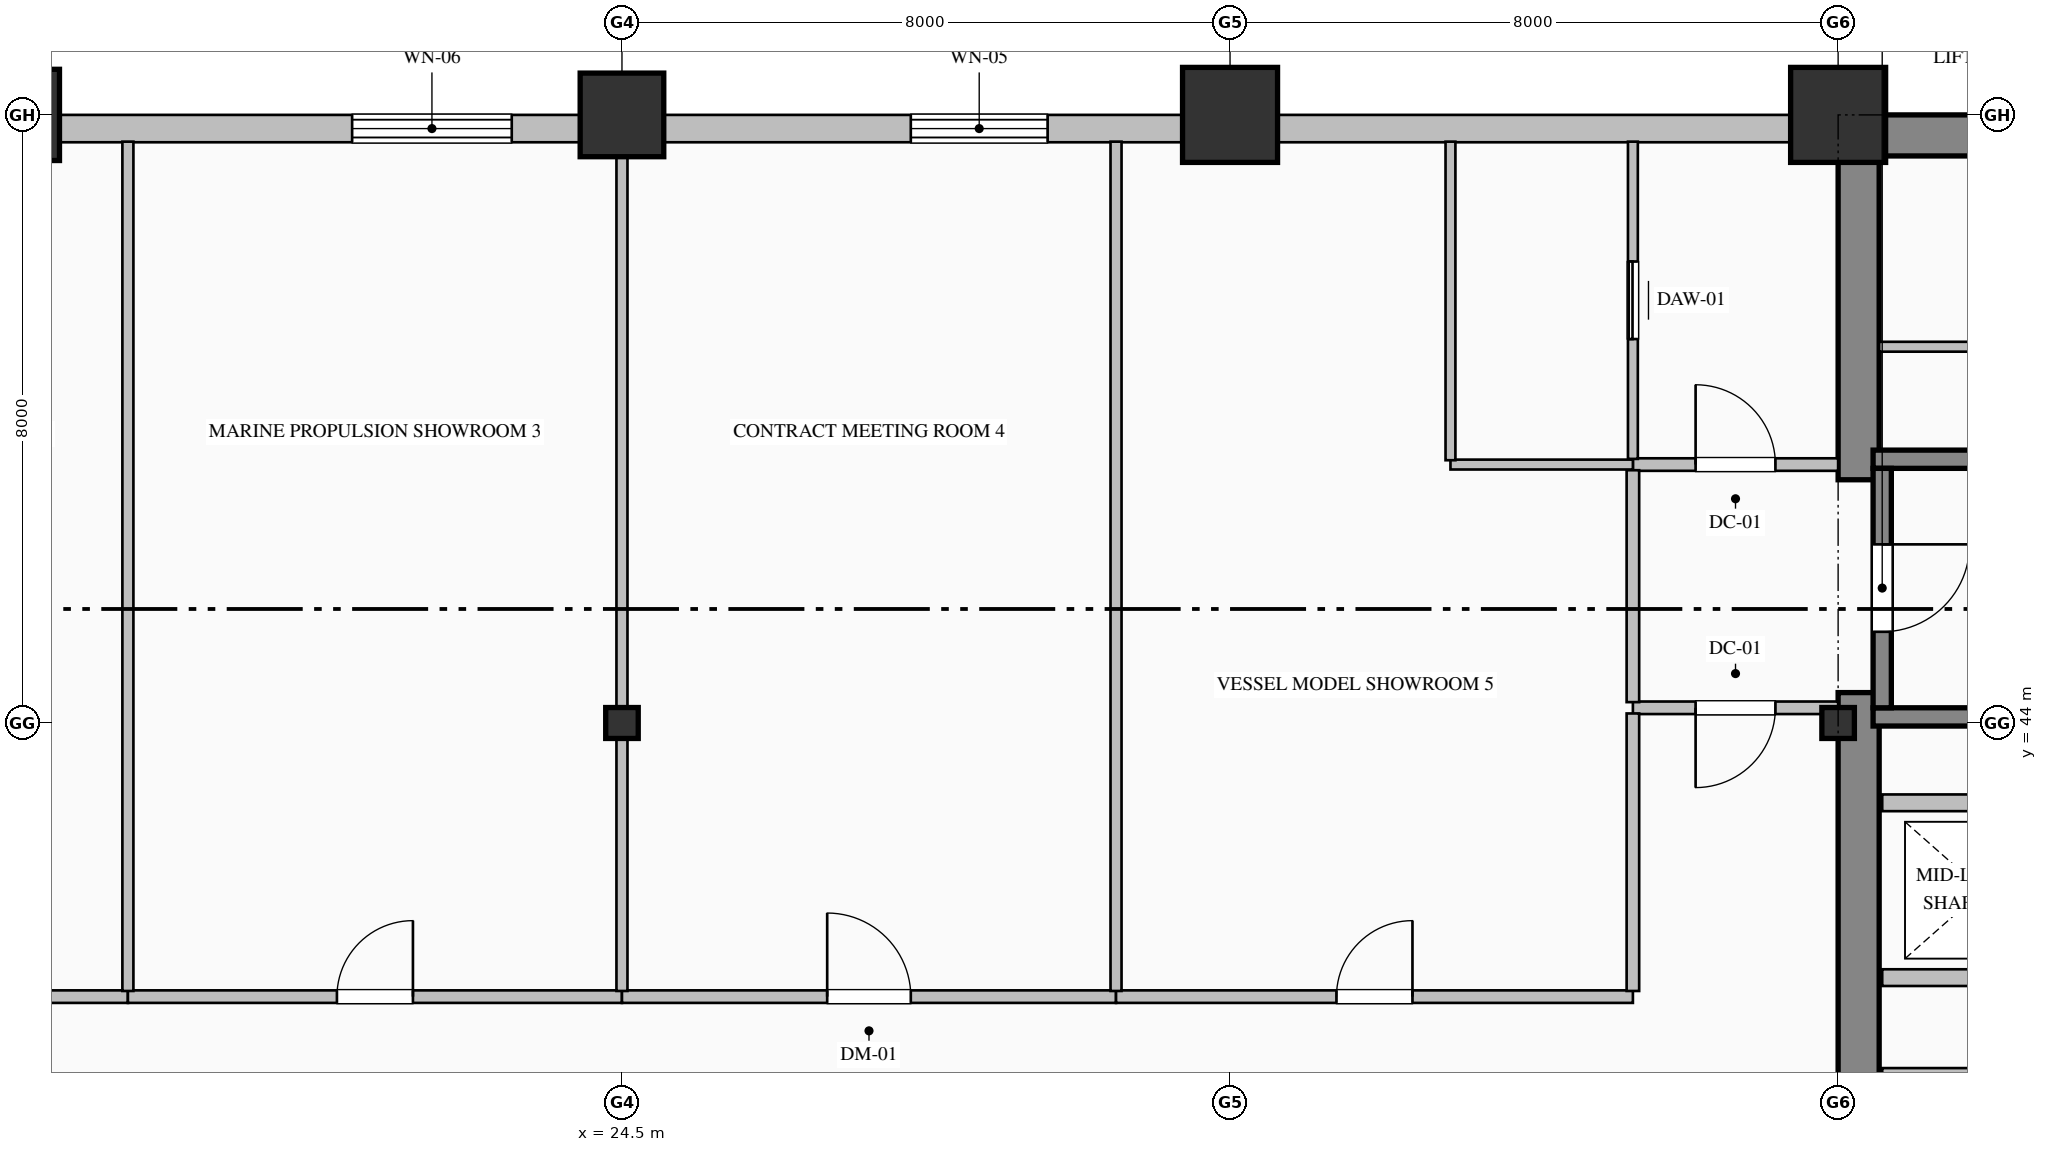
"""IFC4 building model, lengths in metres.
Left out: names, types, materials, properties, quantities, classifications, styles, units other than length and angle.
Written with IfcOpenShell. Run it as: python <this file> out.ifc"""

import sys

from ifc_helpers import new_model, si_unit, direction, frame, frame_2d, origin, origin_2d, place, context, subcontext, project, spatial, rectangle, hollow_rectangle, hollow_circle, i_section, extrude, element, fill, save


model = new_model("IFC4")
c1 = context("Model", 3, precision=1e-05, world=origin(), true_north=direction((0.0, 1.0)))
c2 = subcontext(c1, "Body", "Model", "MODEL_VIEW")
j1 = project(units=[si_unit("LENGTHUNIT", "METRE"), si_unit("PLANEANGLEUNIT", "RADIAN")], contexts=[c1])
p1 = place(None, origin())
s1 = spatial("IfcSite", under=j1, at=p1, CompositionType="ELEMENT")
p2 = place(p1, origin())
s2 = spatial("IfcBuilding", under=s1, at=p2, CompositionType="ELEMENT")
p3 = place(p2, frame((0.0, 0.0, 92.2)))
s3 = spatial("IfcBuildingStorey", under=s2, at=p3, CompositionType="ELEMENT", Elevation=92.2)
p4 = place(p3, frame((40.5, 51.73, 0.0), z_axis=(0.0, 0.0, 1.0), x_axis=(1.0, 0.0, 0.0)))
e1 = element("IfcWall", 1, at=p4, inside=s3, PredefinedType="SHEAR", context=c2, shape_type="SweptSolid", body=[
    extrude(rectangle(XDim=23.5, YDim=0.54, at=frame_2d((11.75, 0.0))), origin(), (0.0, 0.0, 1.0), 3.75),
])
p5 = place(p3, frame((40.77, 36.54, 0.0), z_axis=(0.0, 0.0, 1.0), x_axis=(0.0, 1.0, 0.0)))
e2 = element("IfcWall", 2, at=p5, inside=s3, PredefinedType="SHEAR", context=c2, shape_type="SweptSolid", body=[
    extrude(rectangle(XDim=7.86, YDim=0.54, at=frame_2d((3.93, 0.0))), origin(), (0.0, 0.0, 1.0), 3.75),
])
p6 = place(p3, frame((40.77, 47.2, 0.0), z_axis=(0.0, 0.0, 1.0), x_axis=(0.0, 1.0, 0.0)))
e3 = element("IfcWall", 3, at=p6, inside=s3, PredefinedType="SHEAR", context=c2, shape_type="SweptSolid", body=[
    extrude(rectangle(XDim=4.26, YDim=0.54, at=frame_2d((2.13, 0.0))), origin(), (0.0, 0.0, 1.0), 3.75),
])
p7 = place(p3, frame((16.5, 52.0, 0.0), z_axis=(0.0, 0.0, 1.0), x_axis=(1.0, 0.0, 0.0)))
e4 = element("IfcColumn", 4, at=p7, inside=s3, PredefinedType="COLUMN", context=c2, shape_type="SweptSolid", body=[
    extrude(hollow_circle(Radius=0.6, WallThickness=0.04, at=origin_2d()), origin(), (0.0, 0.0, 1.0), 4.0),
])
p8 = place(p3, frame((24.5, 44.0, 0.0), z_axis=(0.0, 0.0, 1.0), x_axis=(1.0, 0.0, 0.0)))
e5 = element("IfcColumn", 5, at=p8, inside=s3, PredefinedType="COLUMN", context=c2, shape_type="SweptSolid", body=[
    extrude(i_section(OverallWidth=0.407, OverallDepth=0.428, WebThickness=0.02, FlangeThickness=0.035, FilletRadius=0.022, at=origin_2d()), origin(), (0.0, 0.0, 1.0), 4.0),
])
p9 = place(p3, frame((24.5, 52.0, 0.0), z_axis=(0.0, 0.0, 1.0), x_axis=(1.0, 0.0, 0.0)))
e6 = element("IfcColumn", 6, at=p9, inside=s3, PredefinedType="COLUMN", context=c2, shape_type="SweptSolid", body=[
    extrude(hollow_rectangle(XDim=1.1, YDim=1.1, WallThickness=0.04, at=origin_2d()), origin(), (0.0, 0.0, 1.0), 4.0),
])
p10 = place(p3, frame((32.5, 52.0, 0.0), z_axis=(0.0, 0.0, 1.0), x_axis=(1.0, 0.0, 0.0)))
e7 = element("IfcColumn", 7, at=p10, inside=s3, PredefinedType="COLUMN", context=c2, shape_type="SweptSolid", body=[
    extrude(hollow_rectangle(XDim=1.25, YDim=1.25, WallThickness=0.045, at=origin_2d()), origin(), (0.0, 0.0, 1.0), 4.0),
])
p11 = place(p3, frame((40.5, 44.0, 0.0), z_axis=(0.0, 0.0, 1.0), x_axis=(1.0, 0.0, 0.0)))
e8 = element("IfcColumn", 8, at=p11, inside=s3, PredefinedType="COLUMN", context=c2, shape_type="SweptSolid", body=[
    extrude(i_section(OverallWidth=0.407, OverallDepth=0.428, WebThickness=0.02, FlangeThickness=0.035, FilletRadius=0.022, at=origin_2d()), origin(), (0.0, 0.0, 1.0), 4.0),
])
p12 = place(p3, frame((40.5, 52.0, 0.0), z_axis=(0.0, 0.0, 1.0), x_axis=(1.0, 0.0, 0.0)))
e9 = element("IfcColumn", 9, at=p12, inside=s3, PredefinedType="COLUMN", context=c2, shape_type="SweptSolid", body=[
    extrude(hollow_rectangle(XDim=1.25, YDim=1.25, WallThickness=0.045, at=origin_2d()), origin(), (0.0, 0.0, 1.0), 4.0),
])
p13 = place(p3, frame((4.0, 51.82, 0.0), z_axis=(0.0, 0.0, 1.0), x_axis=(1.0, 0.0, 0.0)))
e10 = element("IfcWall", 10, at=p13, inside=s3, PredefinedType="SOLIDWALL", context=c2, shape_type="SweptSolid", body=[
    extrude(rectangle(XDim=36.52, YDim=0.36, at=frame_2d((18.26, 0.0))), origin(), (0.0, 0.0, 1.0), 3.25),
])
p14 = place(p13, frame((16.95, 0.0, 0.85)))
e11 = element("IfcOpeningElement", 11, at=p14, cuts=e10, PredefinedType="OPENING", context=c2, shape_type="SweptSolid", body=[
    extrude(rectangle(XDim=2.1, YDim=2.05, at=frame_2d((1.05, 1.025))), frame((0.0, 0.19, 0.0), z_axis=(0.0, -1.0, 0.0), x_axis=(1.0, 0.0, 0.0)), (0.0, 0.0, 1.0), 0.38),
])
p15 = place(p13, frame((24.3, 0.0, 0.85)))
e12 = element("IfcOpeningElement", 12, at=p15, cuts=e10, PredefinedType="OPENING", context=c2, shape_type="SweptSolid", body=[
    extrude(rectangle(XDim=1.8, YDim=2.05, at=frame_2d((0.9, 1.025))), frame((0.0, 0.19, 0.0), z_axis=(0.0, -1.0, 0.0), x_axis=(1.0, 0.0, 0.0)), (0.0, 0.0, 1.0), 0.38),
])
for number, where, z_axis, x_axis in (
    (13, (40.96, 47.47, 0.0), (0.0, 0.0, 1.0), (1.0, 0.0, 0.0)),
    (14, (49.04, 44.08, 0.0), (0.0, 0.0, 1.0), (-1.0, 0.0, 0.0)),
):
    element("IfcWall", number, at=place(p3, frame(where, z_axis=z_axis, x_axis=x_axis)), inside=s3, PredefinedType="SOLIDWALL", context=c2, shape_type="SweptSolid", body=[
        extrude(rectangle(XDim=8.08, YDim=0.24, at=frame_2d((4.04, 0.0))), origin(), (0.0, 0.0, 1.0), 4.0),
    ])
p16 = place(p3, frame((41.08, 47.35, 0.0), z_axis=(0.0, 0.0, 1.0), x_axis=(0.0, -1.0, 0.0)))
e15 = element("IfcWall", 15, at=p16, inside=s3, PredefinedType="SOLIDWALL", context=c2, shape_type="SweptSolid", body=[
    extrude(rectangle(XDim=3.15, YDim=0.24, at=frame_2d((1.575, 0.0))), origin(), (0.0, 0.0, 1.0), 4.0),
])
p17 = place(p16, frame((1.0, 0.0, 0.0)))
e16 = element("IfcOpeningElement", 16, at=p17, cuts=e15, PredefinedType="OPENING", context=c2, shape_type="SweptSolid", body=[
    extrude(rectangle(XDim=1.15, YDim=2.2, at=frame_2d((0.575, 1.1))), frame((0.0, 0.13, 0.0), z_axis=(0.0, -1.0, 0.0), x_axis=(1.0, 0.0, 0.0)), (0.0, 0.0, 1.0), 0.26),
])
for number, where, z_axis, x_axis in (
    (17, (41.08, 39.35, 0.0), (0.0, 0.0, 1.0), (1.0, 0.0, 0.0)),
    (18, (49.32, 40.65, 0.0), (0.0, 0.0, 1.0), (-1.0, 0.0, 0.0)),
    (19, (41.08, 42.95, 0.0), (0.0, 0.0, 1.0), (1.0, 0.0, 0.0)),
):
    element("IfcWall", number, at=place(p3, frame(where, z_axis=z_axis, x_axis=x_axis)), inside=s3, PredefinedType="PARTITIONING", context=c2, shape_type="SweptSolid", body=[
        extrude(rectangle(XDim=8.24, YDim=0.22, at=frame_2d((4.12, 0.0))), origin(), (0.0, 0.0, 1.0), 3.75),
    ])
p18 = place(p3, frame((37.8, 47.4, 0.0), z_axis=(0.0, 0.0, 1.0), x_axis=(1.0, 0.0, 0.0)))
e20 = element("IfcWall", 20, at=p18, inside=s3, PredefinedType="PARTITIONING", context=c2, shape_type="SweptSolid", body=[
    extrude(rectangle(XDim=2.7, YDim=0.165, at=frame_2d((1.35, 0.0))), origin(), (0.0, 0.0, 1.0), 3.75),
])
p19 = place(p18, frame((0.825, 0.0, 0.0)))
e21 = element("IfcOpeningElement", 21, at=p19, cuts=e20, PredefinedType="OPENING", context=c2, shape_type="SweptSolid", body=[
    extrude(rectangle(XDim=1.05, YDim=2.15, at=frame_2d((0.525, 1.075))), frame((0.0, 0.093, 0.0), z_axis=(0.0, -1.0, 0.0), x_axis=(1.0, 0.0, 0.0)), (0.0, 0.0, 1.0), 0.185),
])
p20 = place(p3, frame((40.5, 44.2, 0.0), z_axis=(0.0, 0.0, 1.0), x_axis=(-1.0, 0.0, 0.0)))
e22 = element("IfcWall", 22, at=p20, inside=s3, PredefinedType="PARTITIONING", context=c2, shape_type="SweptSolid", body=[
    extrude(rectangle(XDim=2.7, YDim=0.165, at=frame_2d((1.35, 0.0))), origin(), (0.0, 0.0, 1.0), 3.75),
])
p21 = place(p20, frame((0.825, 0.0, 0.0)))
e23 = element("IfcOpeningElement", 23, at=p21, cuts=e22, PredefinedType="OPENING", context=c2, shape_type="SweptSolid", body=[
    extrude(rectangle(XDim=1.05, YDim=2.15, at=frame_2d((0.525, 1.075))), frame((0.0, 0.093, 0.0), z_axis=(0.0, -1.0, 0.0), x_axis=(1.0, 0.0, 0.0)), (0.0, 0.0, 1.0), 0.185),
])
p22 = place(p3, frame((37.8, 44.274, 0.0), z_axis=(0.0, 0.0, 1.0), x_axis=(0.0, 1.0, 0.0)))
e24 = element("IfcWall", 24, at=p22, inside=s3, PredefinedType="PARTITIONING", context=c2, shape_type="SweptSolid", body=[
    extrude(rectangle(XDim=3.051, YDim=0.165, at=frame_2d((1.525, 0.0))), origin(), (0.0, 0.0, 1.0), 3.75),
])
p23 = place(p3, frame((37.8, 47.475, 0.0), z_axis=(0.0, 0.0, 1.0), x_axis=(0.0, 1.0, 0.0)))
e25 = element("IfcWall", 25, at=p23, inside=s3, PredefinedType="PARTITIONING", context=c2, shape_type="SweptSolid", body=[
    extrude(rectangle(XDim=4.173, YDim=0.13, at=frame_2d((2.087, 0.0))), origin(), (0.0, 0.0, 1.0), 3.75),
])
p24 = place(p23, frame((1.577, 0.0, 0.0)))
e26 = element("IfcOpeningElement", 26, at=p24, cuts=e25, PredefinedType="OPENING", context=c2, shape_type="SweptSolid", body=[
    extrude(rectangle(XDim=1.02, YDim=2.15, at=frame_2d((0.51, 1.075))), frame((0.0, 0.075, 0.0), z_axis=(0.0, -1.0, 0.0), x_axis=(1.0, 0.0, 0.0)), (0.0, 0.0, 1.0), 0.15),
])
p25 = place(p3, frame((37.8, 47.4, 0.0), z_axis=(0.0, 0.0, 1.0), x_axis=(-1.0, 0.0, 0.0)))
e27 = element("IfcWall", 27, at=p25, inside=s3, PredefinedType="PARTITIONING", context=c2, shape_type="SweptSolid", body=[
    extrude(rectangle(XDim=2.4, YDim=0.13, at=frame_2d((1.2, 0.0))), origin(), (0.0, 0.0, 1.0), 3.75),
])
p26 = place(p3, frame((35.4, 47.457, 0.0), z_axis=(0.0, 0.0, 1.0), x_axis=(0.0, 1.0, 0.0)))
e28 = element("IfcWall", 28, at=p26, inside=s3, PredefinedType="PARTITIONING", context=c2, shape_type="SweptSolid", body=[
    extrude(rectangle(XDim=4.191, YDim=0.13, at=frame_2d((2.095, 0.0))), origin(), (0.0, 0.0, 1.0), 3.75),
])
p27 = place(p3, frame((41.04, 48.95, 0.0), z_axis=(0.0, 0.0, 1.0), x_axis=(1.0, 0.0, 0.0)))
e29 = element("IfcWall", 29, at=p27, inside=s3, PredefinedType="PARTITIONING", context=c2, shape_type="SweptSolid", body=[
    extrude(rectangle(XDim=5.76, YDim=0.13, at=frame_2d((2.88, 0.0))), origin(), (0.0, 0.0, 1.0), 3.75),
])
p28 = place(p27, frame((2.42, 0.0, 0.0)))
e30 = element("IfcOpeningElement", 30, at=p28, cuts=e29, PredefinedType="OPENING", context=c2, shape_type="SweptSolid", body=[
    extrude(rectangle(XDim=0.92, YDim=2.15, at=frame_2d((0.46, 1.075))), frame((0.0, 0.075, 0.0), z_axis=(0.0, -1.0, 0.0), x_axis=(1.0, 0.0, 0.0)), (0.0, 0.0, 1.0), 0.15),
])
p29 = place(p3, frame((11.5, 40.4, 0.0), z_axis=(0.0, 0.0, 1.0), x_axis=(1.0, 0.0, 0.0)))
e31 = element("IfcWall", 31, at=p29, inside=s3, PredefinedType="PARTITIONING", context=c2, shape_type="SweptSolid", body=[
    extrude(rectangle(XDim=6.5, YDim=0.165, at=frame_2d((3.25, 0.0))), origin(), (0.0, 0.0, 1.0), 3.75),
])
p30 = place(p29, frame((2.75, 0.0, 0.0)))
e32 = element("IfcOpeningElement", 32, at=p30, cuts=e31, PredefinedType="OPENING", context=c2, shape_type="SweptSolid", body=[
    extrude(rectangle(XDim=1.0, YDim=2.15, at=frame_2d((0.5, 1.075))), frame((0.0, 0.093, 0.0), z_axis=(0.0, -1.0, 0.0), x_axis=(1.0, 0.0, 0.0)), (0.0, 0.0, 1.0), 0.185),
])
p31 = place(p3, frame((18.0, 40.4, 0.0), z_axis=(0.0, 0.0, 1.0), x_axis=(1.0, 0.0, 0.0)))
e33 = element("IfcWall", 33, at=p31, inside=s3, PredefinedType="PARTITIONING", context=c2, shape_type="SweptSolid", body=[
    extrude(rectangle(XDim=6.5, YDim=0.165, at=frame_2d((3.25, 0.0))), origin(), (0.0, 0.0, 1.0), 3.75),
])
p32 = place(p31, frame((2.75, 0.0, 0.0)))
e34 = element("IfcOpeningElement", 34, at=p32, cuts=e33, PredefinedType="OPENING", context=c2, shape_type="SweptSolid", body=[
    extrude(rectangle(XDim=1.0, YDim=2.15, at=frame_2d((0.5, 1.075))), frame((0.0, 0.093, 0.0), z_axis=(0.0, -1.0, 0.0), x_axis=(1.0, 0.0, 0.0)), (0.0, 0.0, 1.0), 0.185),
])
p33 = place(p3, frame((24.5, 40.4, 0.0), z_axis=(0.0, 0.0, 1.0), x_axis=(1.0, 0.0, 0.0)))
e35 = element("IfcWall", 35, at=p33, inside=s3, PredefinedType="PARTITIONING", context=c2, shape_type="SweptSolid", body=[
    extrude(rectangle(XDim=6.5, YDim=0.165, at=frame_2d((3.25, 0.0))), origin(), (0.0, 0.0, 1.0), 3.75),
])
p34 = place(p33, frame((2.7, 0.0, 0.0)))
e36 = element("IfcOpeningElement", 36, at=p34, cuts=e35, PredefinedType="OPENING", context=c2, shape_type="SweptSolid", body=[
    extrude(rectangle(XDim=1.1, YDim=2.2, at=frame_2d((0.55, 1.1))), frame((0.0, 0.093, 0.0), z_axis=(0.0, -1.0, 0.0), x_axis=(1.0, 0.0, 0.0)), (0.0, 0.0, 1.0), 0.185),
])
p35 = place(p3, frame((31.0, 40.4, 0.0), z_axis=(0.0, 0.0, 1.0), x_axis=(1.0, 0.0, 0.0)))
e37 = element("IfcWall", 37, at=p35, inside=s3, PredefinedType="PARTITIONING", context=c2, shape_type="SweptSolid", body=[
    extrude(rectangle(XDim=6.8, YDim=0.165, at=frame_2d((3.4, 0.0))), origin(), (0.0, 0.0, 1.0), 3.75),
])
p36 = place(p35, frame((2.9, 0.0, 0.0)))
e38 = element("IfcOpeningElement", 38, at=p36, cuts=e37, PredefinedType="OPENING", context=c2, shape_type="SweptSolid", body=[
    extrude(rectangle(XDim=1.0, YDim=2.15, at=frame_2d((0.5, 1.075))), frame((0.0, 0.093, 0.0), z_axis=(0.0, -1.0, 0.0), x_axis=(1.0, 0.0, 0.0)), (0.0, 0.0, 1.0), 0.185),
])
p37 = place(p3, frame((37.8, 40.475, 0.0), z_axis=(0.0, 0.0, 1.0), x_axis=(0.0, 1.0, 0.0)))
e39 = element("IfcWall", 39, at=p37, inside=s3, PredefinedType="PARTITIONING", context=c2, shape_type="SweptSolid", body=[
    extrude(rectangle(XDim=3.651, YDim=0.165, at=frame_2d((1.825, 0.0))), origin(), (0.0, 0.0, 1.0), 3.75),
])
p38 = place(p3, frame((18.0, 51.648, 0.0), z_axis=(0.0, 0.0, 1.0), x_axis=(0.0, -1.0, 0.0)))
e40 = element("IfcWall", 40, at=p38, inside=s3, PredefinedType="PARTITIONING", context=c2, shape_type="SweptSolid", body=[
    extrude(rectangle(XDim=11.173, YDim=0.145, at=frame_2d((5.587, 0.0))), origin(), (0.0, 0.0, 1.0), 3.75),
])
p39 = place(p3, frame((24.5, 51.648, 0.0), z_axis=(0.0, 0.0, 1.0), x_axis=(0.0, -1.0, 0.0)))
e41 = element("IfcWall", 41, at=p39, inside=s3, PredefinedType="PARTITIONING", context=c2, shape_type="SweptSolid", body=[
    extrude(rectangle(XDim=11.173, YDim=0.145, at=frame_2d((5.587, 0.0))), origin(), (0.0, 0.0, 1.0), 3.042),
])
p40 = place(p3, frame((31.0, 51.648, 0.0), z_axis=(0.0, 0.0, 1.0), x_axis=(0.0, -1.0, 0.0)))
e42 = element("IfcWall", 42, at=p40, inside=s3, PredefinedType="PARTITIONING", context=c2, shape_type="SweptSolid", body=[
    extrude(rectangle(XDim=11.173, YDim=0.145, at=frame_2d((5.587, 0.0))), origin(), (0.0, 0.0, 1.0), 3.75),
])
p41 = place(p14, origin())
e43 = element("IfcWindow", 43, at=p41, inside=s3, PartitioningType="TRIPLE_PANEL_VERTICAL", PredefinedType="WINDOW", context=c2, shape_type="SweptSolid", body=[
    extrude(rectangle(XDim=2.1, YDim=2.05, at=frame_2d((1.05, 1.025))), frame((0.0, 0.15, 0.0), z_axis=(0.0, -1.0, 0.0), x_axis=(1.0, 0.0, 0.0)), (0.0, 0.0, 1.0), 0.06),
])
fill(e11, e43)
p42 = place(p15, origin())
e44 = element("IfcWindow", 44, at=p42, inside=s3, PartitioningType="TRIPLE_PANEL_VERTICAL", PredefinedType="WINDOW", context=c2, shape_type="SweptSolid", body=[
    extrude(rectangle(XDim=1.8, YDim=2.05, at=frame_2d((0.9, 1.025))), frame((0.0, 0.15, 0.0), z_axis=(0.0, -1.0, 0.0), x_axis=(1.0, 0.0, 0.0)), (0.0, 0.0, 1.0), 0.06),
])
fill(e12, e44)
p43 = place(p17, origin())
e45 = element("IfcDoor", 45, at=p43, inside=s3, OperationType="SINGLE_SWING_LEFT", PredefinedType="DOOR", context=c2, shape_type="SweptSolid", body=[
    extrude(rectangle(XDim=1.15, YDim=2.2, at=frame_2d((0.575, 1.1))), frame((0.0, 0.025, 0.0), z_axis=(0.0, -1.0, 0.0), x_axis=(1.0, 0.0, 0.0)), (0.0, 0.0, 1.0), 0.05),
])
fill(e16, e45)
p44 = place(p19, origin())
e46 = element("IfcDoor", 46, at=p44, inside=s3, OperationType="SINGLE_SWING_LEFT", PredefinedType="DOOR", context=c2, shape_type="SweptSolid", body=[
    extrude(rectangle(XDim=1.05, YDim=2.15, at=frame_2d((0.525, 1.075))), frame((0.0, 0.025, 0.0), z_axis=(0.0, -1.0, 0.0), x_axis=(1.0, 0.0, 0.0)), (0.0, 0.0, 1.0), 0.05),
])
fill(e21, e46)
p45 = place(p21, origin())
e47 = element("IfcDoor", 47, at=p45, inside=s3, OperationType="SINGLE_SWING_RIGHT", PredefinedType="DOOR", context=c2, shape_type="SweptSolid", body=[
    extrude(rectangle(XDim=1.05, YDim=2.15, at=frame_2d((0.525, 1.075))), frame((0.0, 0.025, 0.0), z_axis=(0.0, -1.0, 0.0), x_axis=(1.0, 0.0, 0.0)), (0.0, 0.0, 1.0), 0.05),
])
fill(e23, e47)
p46 = place(p24, origin())
e48 = element("IfcDoor", 48, at=p46, inside=s3, OperationType="SLIDING_TO_LEFT", PredefinedType="DOOR", context=c2, shape_type="SweptSolid", body=[
    extrude(rectangle(XDim=1.02, YDim=2.15, at=frame_2d((0.51, 1.075))), frame((0.0, 0.025, 0.0), z_axis=(0.0, -1.0, 0.0), x_axis=(1.0, 0.0, 0.0)), (0.0, 0.0, 1.0), 0.05),
])
fill(e26, e48)
p47 = place(p32, origin())
e49 = element("IfcDoor", 49, at=p47, inside=s3, OperationType="SINGLE_SWING_RIGHT", PredefinedType="DOOR", context=c2, shape_type="SweptSolid", body=[
    extrude(rectangle(XDim=1.0, YDim=2.15, at=frame_2d((0.5, 1.075))), frame((0.0, 0.025, 0.0), z_axis=(0.0, -1.0, 0.0), x_axis=(1.0, 0.0, 0.0)), (0.0, 0.0, 1.0), 0.05),
])
fill(e34, e49)
p48 = place(p34, origin())
e50 = element("IfcDoor", 50, at=p48, inside=s3, OperationType="SINGLE_SWING_LEFT", PredefinedType="DOOR", context=c2, shape_type="SweptSolid", body=[
    extrude(rectangle(XDim=1.1, YDim=2.2, at=frame_2d((0.55, 1.1))), frame((0.0, 0.025, 0.0), z_axis=(0.0, -1.0, 0.0), x_axis=(1.0, 0.0, 0.0)), (0.0, 0.0, 1.0), 0.05),
])
fill(e36, e50)
p49 = place(p36, origin())
e51 = element("IfcDoor", 51, at=p49, inside=s3, OperationType="SINGLE_SWING_RIGHT", PredefinedType="DOOR", context=c2, shape_type="SweptSolid", body=[
    extrude(rectangle(XDim=1.0, YDim=2.15, at=frame_2d((0.5, 1.075))), frame((0.0, 0.025, 0.0), z_axis=(0.0, -1.0, 0.0), x_axis=(1.0, 0.0, 0.0)), (0.0, 0.0, 1.0), 0.05),
])
fill(e38, e51)
save(model, sys.argv[1])
